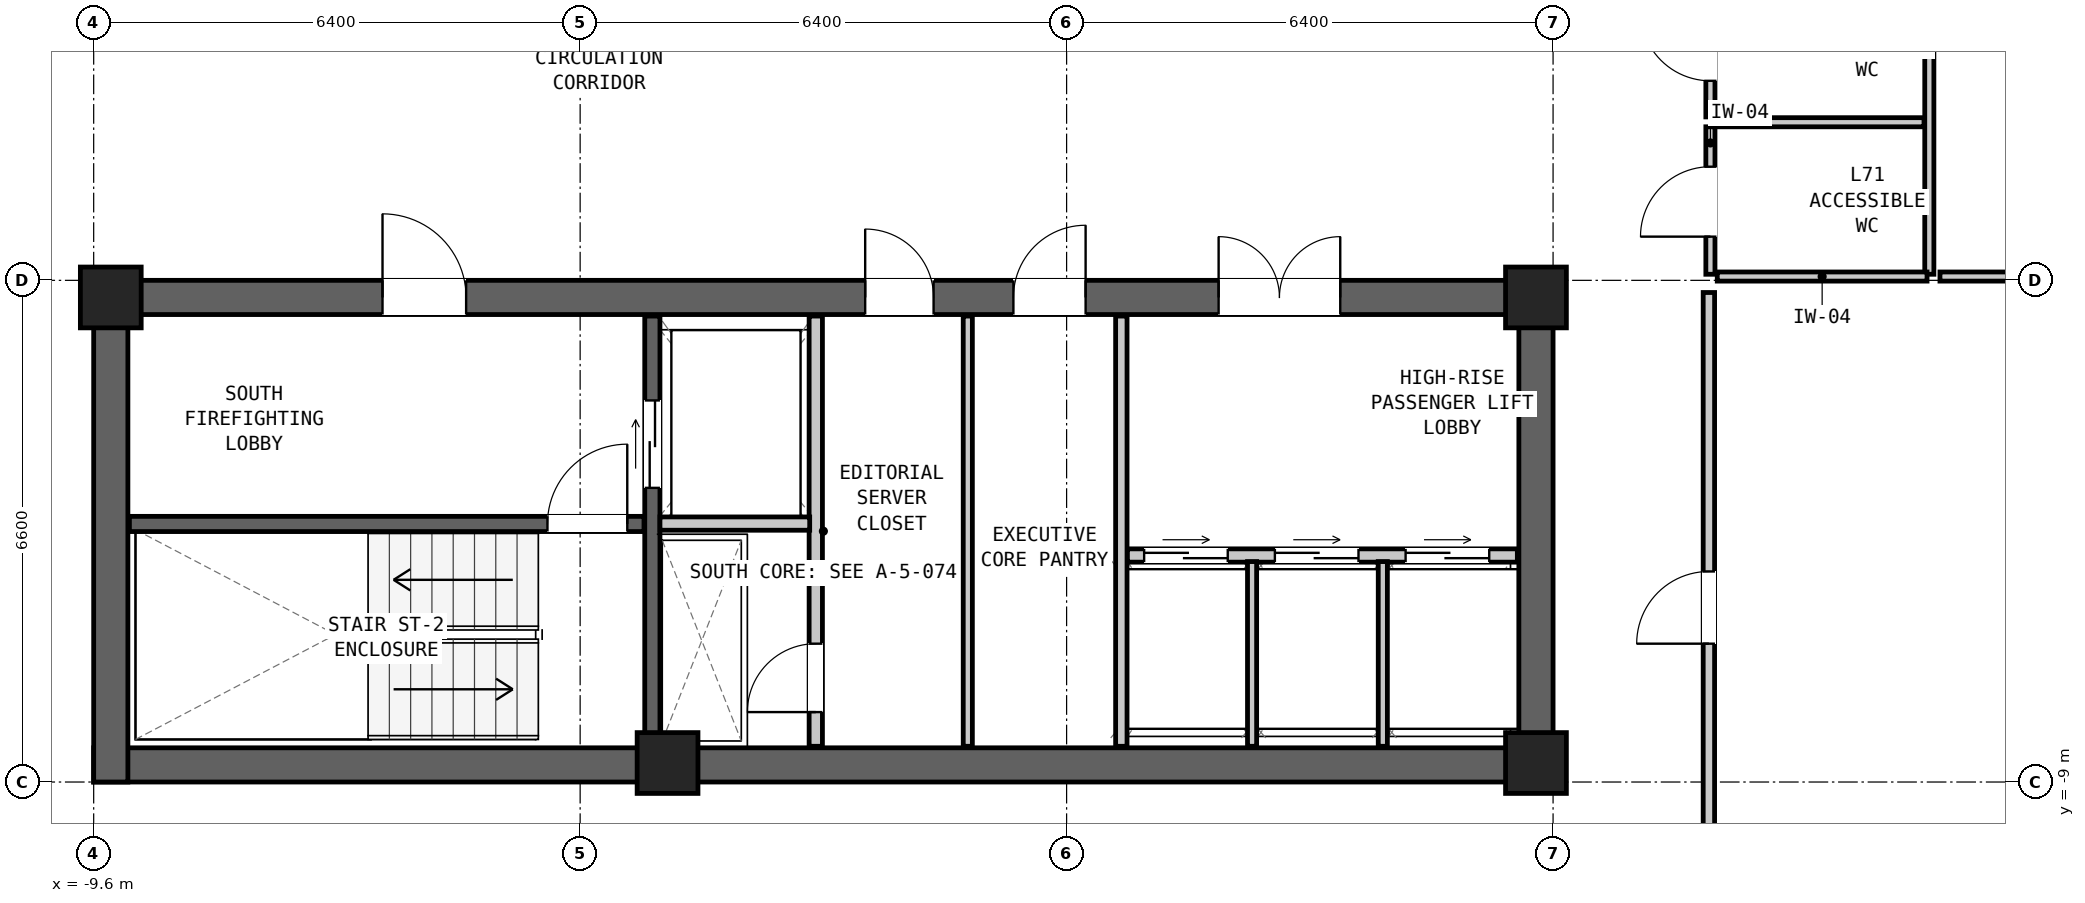
"""IFC4 building model, lengths in metres.
Left out: names, types, materials, properties, quantities, classifications, styles, units other than length and angle.
Written with IfcOpenShell. Run it as: python <this file> out.ifc"""

import sys

from ifc_helpers import new_model, si_unit, direction, frame, frame_2d, origin, origin_2d, place, context, subcontext, project, spatial, rectangle, extrude, element, fill, save


model = new_model("IFC4")
c1 = context("Model", 3, precision=1e-05, world=origin(), true_north=direction((0.0, 1.0)))
c2 = subcontext(c1, "Body", "Model", "MODEL_VIEW")
j1 = project(units=[si_unit("LENGTHUNIT", "METRE"), si_unit("PLANEANGLEUNIT", "RADIAN")], contexts=[c1])
p1 = place(None, origin())
s1 = spatial("IfcSite", under=j1, at=p1, CompositionType="ELEMENT")
p2 = place(p1, origin())
s2 = spatial("IfcBuilding", under=s1, at=p2, CompositionType="ELEMENT")
p3 = place(p2, frame((0.0, 0.0, 242.85)))
s3 = spatial("IfcBuildingStorey", under=s2, at=p3, CompositionType="ELEMENT", Elevation=242.85)
p4 = place(p3, frame((-9.6, -8.775, 0.0), z_axis=(0.0, 0.0, 1.0), x_axis=(1.0, 0.0, 0.0)))
e1 = element("IfcWall", 1, at=p4, inside=s3, PredefinedType="SHEAR", context=c2, shape_type="SweptSolid", body=[
    extrude(rectangle(XDim=19.2, YDim=0.45, at=frame_2d((9.6, 0.0))), origin(), (0.0, 0.0, 1.0), 3.05),
])
p5 = place(p3, frame((-9.6, -2.625, 0.0), z_axis=(0.0, 0.0, 1.0), x_axis=(1.0, 0.0, 0.0)))
e2 = element("IfcWall", 2, at=p5, inside=s3, PredefinedType="SHEAR", context=c2, shape_type="SweptSolid", body=[
    extrude(rectangle(XDim=19.2, YDim=0.45, at=frame_2d((9.6, 0.0))), origin(), (0.0, 0.0, 1.0), 3.05),
])
p6 = place(p5, frame((3.8, 0.0, 0.0)))
e3 = element("IfcOpeningElement", 3, at=p6, cuts=e2, PredefinedType="OPENING", context=c2, shape_type="SweptSolid", body=[
    extrude(rectangle(XDim=1.1, YDim=2.08, at=frame_2d((0.55, 1.04))), frame((0.0, 0.237, 0.0), z_axis=(0.0, -1.0, 0.0), x_axis=(1.0, 0.0, 0.0)), (0.0, 0.0, 1.0), 0.474),
])
p7 = place(p5, frame((10.15, 0.0, 0.0)))
e4 = element("IfcOpeningElement", 4, at=p7, cuts=e2, PredefinedType="OPENING", context=c2, shape_type="SweptSolid", body=[
    extrude(rectangle(XDim=0.9, YDim=2.05, at=frame_2d((0.45, 1.025))), frame((0.0, 0.237, 0.0), z_axis=(0.0, -1.0, 0.0), x_axis=(1.0, 0.0, 0.0)), (0.0, 0.0, 1.0), 0.474),
])
p8 = place(p5, frame((12.1, 0.0, 0.0)))
e5 = element("IfcOpeningElement", 5, at=p8, cuts=e2, PredefinedType="OPENING", context=c2, shape_type="SweptSolid", body=[
    extrude(rectangle(XDim=0.95, YDim=2.1, at=frame_2d((0.475, 1.05))), frame((0.0, 0.237, 0.0), z_axis=(0.0, -1.0, 0.0), x_axis=(1.0, 0.0, 0.0)), (0.0, 0.0, 1.0), 0.474),
])
p9 = place(p5, frame((14.8, 0.0, 0.0)))
e6 = element("IfcOpeningElement", 6, at=p9, cuts=e2, PredefinedType="OPENING", context=c2, shape_type="SweptSolid", body=[
    extrude(rectangle(XDim=1.6, YDim=2.12, at=frame_2d((0.8, 1.06))), frame((0.0, 0.237, 0.0), z_axis=(0.0, -1.0, 0.0), x_axis=(1.0, 0.0, 0.0)), (0.0, 0.0, 1.0), 0.474),
])
for number, where, z_axis, x_axis in (
    (7, (-9.375, -9.0, 0.0), (0.0, 0.0, 1.0), (0.0, 1.0, 0.0)),
    (8, (9.375, -9.0, 0.0), (0.0, 0.0, 1.0), (0.0, 1.0, 0.0)),
):
    element("IfcWall", number, at=place(p3, frame(where, z_axis=z_axis, x_axis=x_axis)), inside=s3, PredefinedType="SHEAR", context=c2, shape_type="SweptSolid", body=[
        extrude(rectangle(XDim=6.6, YDim=0.45, at=frame_2d((3.3, 0.0))), origin(), (0.0, 0.0, 1.0), 3.05),
    ])
for number, where, z_axis, x_axis in (
    (9, (-9.375, -2.625, 0.0), (0.0, 0.0, 1.0), (1.0, 0.0, 0.0)),
    (10, (9.375, -2.625, 0.0), (0.0, 0.0, 1.0), (1.0, 0.0, 0.0)),
    (11, (-2.05, -8.75, 0.0), (0.0, 0.0, 1.0), (1.0, 0.0, 0.0)),
    (12, (9.375, -8.75, 0.0), (0.0, 0.0, 1.0), (1.0, 0.0, 0.0)),
):
    element("IfcColumn", number, at=place(p3, frame(where, z_axis=z_axis, x_axis=x_axis)), inside=s3, PredefinedType="COLUMN", context=c2, shape_type="SweptSolid", body=[
        extrude(rectangle(XDim=0.8, YDim=0.8, at=origin_2d()), origin(), (0.0, 0.0, 1.0), 3.05),
    ])
p10 = place(p3, frame((-9.13, -5.605, 0.0), z_axis=(0.0, 0.0, 1.0), x_axis=(1.0, 0.0, 0.0)))
e13 = element("IfcWall", 13, at=p10, inside=s3, PredefinedType="SHEAR", context=c2, shape_type="SweptSolid", body=[
    extrude(rectangle(XDim=6.77, YDim=0.2, at=frame_2d((3.385, 0.0))), origin(), (0.0, 0.0, 1.0), 2.86),
])
p11 = place(p10, frame((5.5, 0.0, 0.0)))
e14 = element("IfcOpeningElement", 14, at=p11, cuts=e13, PredefinedType="OPENING", context=c2, shape_type="SweptSolid", body=[
    extrude(rectangle(XDim=1.05, YDim=2.08, at=frame_2d((0.525, 1.04))), frame((0.0, 0.112, 0.0), z_axis=(0.0, -1.0, 0.0), x_axis=(1.0, 0.0, 0.0)), (0.0, 0.0, 1.0), 0.224),
])
p12 = place(p3, frame((-2.25, -8.53, 0.0), z_axis=(0.0, 0.0, 1.0), x_axis=(0.0, 1.0, 0.0)))
e15 = element("IfcWall", 15, at=p12, inside=s3, PredefinedType="SHEAR", context=c2, shape_type="SweptSolid", body=[
    extrude(rectangle(XDim=5.66, YDim=0.2, at=frame_2d((2.83, 0.0))), origin(), (0.0, 0.0, 1.0), 2.86),
])
p13 = place(p12, frame((3.4, 0.0, 0.0)))
e16 = element("IfcOpeningElement", 16, at=p13, cuts=e15, PredefinedType="OPENING", context=c2, shape_type="SweptSolid", body=[
    extrude(rectangle(XDim=1.15, YDim=2.08, at=frame_2d((0.575, 1.04))), frame((0.0, 0.112, 0.0), z_axis=(0.0, -1.0, 0.0), x_axis=(1.0, 0.0, 0.0)), (0.0, 0.0, 1.0), 0.224),
])
p14 = place(p3, frame((-0.1, -8.53, 0.0), z_axis=(0.0, 0.0, 1.0), x_axis=(0.0, 1.0, 0.0)))
e17 = element("IfcWall", 17, at=p14, inside=s3, PredefinedType="PARTITIONING", context=c2, shape_type="SweptSolid", body=[
    extrude(rectangle(XDim=5.66, YDim=0.175, at=frame_2d((2.83, 0.0))), origin(), (0.0, 0.0, 1.0), 2.86),
])
p15 = place(p14, frame((0.45, 0.0, 0.0)))
e18 = element("IfcOpeningElement", 18, at=p15, cuts=e17, PredefinedType="OPENING", context=c2, shape_type="SweptSolid", body=[
    extrude(rectangle(XDim=0.9, YDim=2.05, at=frame_2d((0.45, 1.025))), frame((0.0, 0.1, 0.0), z_axis=(0.0, -1.0, 0.0), x_axis=(1.0, 0.0, 0.0)), (0.0, 0.0, 1.0), 0.199),
])
p16 = place(p3, frame((-2.15, -5.6, 0.0), z_axis=(0.0, 0.0, 1.0), x_axis=(1.0, 0.0, 0.0)))
e19 = element("IfcWall", 19, at=p16, inside=s3, PredefinedType="PARTITIONING", context=c2, shape_type="SweptSolid", body=[
    extrude(rectangle(XDim=1.97, YDim=0.175, at=frame_2d((0.985, 0.0))), origin(), (0.0, 0.0, 1.0), 2.86),
])
p17 = place(p3, frame((3.92, -8.53, 0.0), z_axis=(0.0, 0.0, 1.0), x_axis=(0.0, 1.0, 0.0)))
e20 = element("IfcWall", 20, at=p17, inside=s3, PredefinedType="PARTITIONING", context=c2, shape_type="SweptSolid", body=[
    extrude(rectangle(XDim=5.66, YDim=0.15, at=frame_2d((2.83, 0.0))), origin(), (0.0, 0.0, 1.0), 2.86),
])
p18 = place(p3, frame((1.9, -8.53, 0.0), z_axis=(0.0, 0.0, 1.0), x_axis=(0.0, 1.0, 0.0)))
e21 = element("IfcWall", 21, at=p18, inside=s3, PredefinedType="PARTITIONING", context=c2, shape_type="SweptSolid", body=[
    extrude(rectangle(XDim=5.66, YDim=0.12, at=frame_2d((2.83, 0.0))), origin(), (0.0, 0.0, 1.0), 2.86),
])
p19 = place(p3, frame((4.0, -6.02, 0.0), z_axis=(0.0, 0.0, 1.0), x_axis=(1.0, 0.0, 0.0)))
e22 = element("IfcWall", 22, at=p19, inside=s3, PredefinedType="PARTITIONING", context=c2, shape_type="SweptSolid", body=[
    extrude(rectangle(XDim=5.13, YDim=0.175, at=frame_2d((2.565, 0.0))), origin(), (0.0, 0.0, 1.0), 2.86),
])
p20 = place(p19, frame((0.22, 0.0, 0.0)))
e23 = element("IfcOpeningElement", 23, at=p20, cuts=e22, PredefinedType="OPENING", context=c2, shape_type="SweptSolid", body=[
    extrude(rectangle(XDim=1.1, YDim=2.06, at=frame_2d((0.55, 1.03))), frame((0.0, 0.1, 0.0), z_axis=(0.0, -1.0, 0.0), x_axis=(1.0, 0.0, 0.0)), (0.0, 0.0, 1.0), 0.199),
])
p21 = place(p19, frame((1.94, 0.0, 0.0)))
e24 = element("IfcOpeningElement", 24, at=p21, cuts=e22, PredefinedType="OPENING", context=c2, shape_type="SweptSolid", body=[
    extrude(rectangle(XDim=1.1, YDim=2.06, at=frame_2d((0.55, 1.03))), frame((0.0, 0.1, 0.0), z_axis=(0.0, -1.0, 0.0), x_axis=(1.0, 0.0, 0.0)), (0.0, 0.0, 1.0), 0.199),
])
p22 = place(p19, frame((3.66, 0.0, 0.0)))
e25 = element("IfcOpeningElement", 25, at=p22, cuts=e22, PredefinedType="OPENING", context=c2, shape_type="SweptSolid", body=[
    extrude(rectangle(XDim=1.1, YDim=2.06, at=frame_2d((0.55, 1.03))), frame((0.0, 0.1, 0.0), z_axis=(0.0, -1.0, 0.0), x_axis=(1.0, 0.0, 0.0)), (0.0, 0.0, 1.0), 0.199),
])
for number, where, z_axis, x_axis in (
    (26, (5.64, -8.53, 0.0), (0.0, 0.0, 1.0), (0.0, 1.0, 0.0)),
    (27, (7.36, -8.53, 0.0), (0.0, 0.0, 1.0), (0.0, 1.0, 0.0)),
):
    element("IfcWall", number, at=place(p3, frame(where, z_axis=z_axis, x_axis=x_axis)), inside=s3, PredefinedType="PARTITIONING", context=c2, shape_type="SweptSolid", body=[
        extrude(rectangle(XDim=2.43, YDim=0.12, at=frame_2d((1.215, 0.0))), origin(), (0.0, 0.0, 1.0), 2.86),
    ])
p23 = place(p3, frame((11.67, -2.32, 0.0), z_axis=(0.0, 0.0, 1.0), x_axis=(0.0, 1.0, 0.0)))
e28 = element("IfcWall", 28, at=p23, inside=s3, PredefinedType="PARTITIONING", context=c2, shape_type="SweptSolid", body=[
    extrude(rectangle(XDim=1.94, YDim=0.12, at=frame_2d((0.97, 0.0))), origin(), (0.0, 0.0, 1.0), 2.86),
])
p24 = place(p23, frame((0.495, 0.0, 0.0)))
e29 = element("IfcOpeningElement", 29, at=p24, cuts=e28, PredefinedType="OPENING", context=c2, shape_type="SweptSolid", body=[
    extrude(rectangle(XDim=0.92, YDim=2.1, at=frame_2d((0.46, 1.05))), frame((0.0, 0.072, 0.0), z_axis=(0.0, -1.0, 0.0), x_axis=(1.0, 0.0, 0.0)), (0.0, 0.0, 1.0), 0.144),
])
p25 = place(p3, frame((11.67, -0.25, 0.0), z_axis=(0.0, 0.0, 1.0), x_axis=(0.0, 1.0, 0.0)))
e30 = element("IfcWall", 30, at=p25, inside=s3, PredefinedType="PARTITIONING", context=c2, shape_type="SweptSolid", body=[
    extrude(rectangle(XDim=1.9, YDim=0.12, at=frame_2d((0.95, 0.0))), origin(), (0.0, 0.0, 1.0), 2.86),
])
p26 = place(p25, frame((0.475, 0.0, 0.0)))
e31 = element("IfcOpeningElement", 31, at=p26, cuts=e30, PredefinedType="OPENING", context=c2, shape_type="SweptSolid", body=[
    extrude(rectangle(XDim=0.92, YDim=2.1, at=frame_2d((0.46, 1.05))), frame((0.0, 0.072, 0.0), z_axis=(0.0, -1.0, 0.0), x_axis=(1.0, 0.0, 0.0)), (0.0, 0.0, 1.0), 0.144),
])
p27 = place(p3, frame((14.55, -2.32, 0.0), z_axis=(0.0, 0.0, 1.0), x_axis=(0.0, 1.0, 0.0)))
e32 = element("IfcWall", 32, at=p27, inside=s3, PredefinedType="PARTITIONING", context=c2, shape_type="SweptSolid", body=[
    extrude(rectangle(XDim=5.93, YDim=0.12, at=frame_2d((2.965, 0.0))), origin(), (0.0, 0.0, 1.0), 2.86),
])
p28 = place(p3, frame((11.76, -2.35, 0.0), z_axis=(0.0, 0.0, 1.0), x_axis=(1.0, 0.0, 0.0)))
e33 = element("IfcWall", 33, at=p28, inside=s3, PredefinedType="PARTITIONING", context=c2, shape_type="SweptSolid", body=[
    extrude(rectangle(XDim=2.76, YDim=0.12, at=frame_2d((1.38, 0.0))), origin(), (0.0, 0.0, 1.0), 1.722),
])
p29 = place(p3, frame((11.76, -0.32, 0.0), z_axis=(0.0, 0.0, 1.0), x_axis=(1.0, 0.0, 0.0)))
e34 = element("IfcWall", 34, at=p29, inside=s3, PredefinedType="PARTITIONING", context=c2, shape_type="SweptSolid", body=[
    extrude(rectangle(XDim=2.72, YDim=0.12, at=frame_2d((1.36, 0.0))), origin(), (0.0, 0.0, 1.0), 2.86),
])
p30 = place(p3, frame((14.69, -2.35, 0.0), z_axis=(0.0, 0.0, 1.0), x_axis=(1.0, 0.0, 0.0)))
e35 = element("IfcWall", 35, at=p30, inside=s3, PredefinedType="PARTITIONING", context=c2, shape_type="SweptSolid", body=[
    extrude(rectangle(XDim=6.927, YDim=0.12, at=frame_2d((3.464, 0.0))), origin(), (0.0, 0.0, 1.0), 1.722),
])
p31 = place(p3, frame((11.65, -10.85, 0.0), z_axis=(0.0, 0.0, 1.0), x_axis=(0.0, 1.0, 0.0)))
e36 = element("IfcWall", 36, at=p31, inside=s3, PredefinedType="PARTITIONING", context=c2, shape_type="SweptSolid", body=[
    extrude(rectangle(XDim=8.29, YDim=0.15, at=frame_2d((4.145, 0.0))), origin(), (0.0, 0.0, 1.0), 2.86),
])
p32 = place(p31, frame((3.67, 0.0, 0.0)))
e37 = element("IfcOpeningElement", 37, at=p32, cuts=e36, PredefinedType="OPENING", context=c2, shape_type="SweptSolid", body=[
    extrude(rectangle(XDim=0.95, YDim=2.1, at=frame_2d((0.475, 1.05))), frame((0.0, 0.087, 0.0), z_axis=(0.0, -1.0, 0.0), x_axis=(1.0, 0.0, 0.0)), (0.0, 0.0, 1.0), 0.174),
])
p33 = place(p11, origin())
e38 = element("IfcDoor", 38, at=p33, inside=s3, OperationType="SINGLE_SWING_RIGHT", PredefinedType="DOOR", context=c2, shape_type="SweptSolid", body=[
    extrude(rectangle(XDim=1.05, YDim=2.08, at=frame_2d((0.525, 1.04))), frame((0.0, 0.025, 0.0), z_axis=(0.0, -1.0, 0.0), x_axis=(1.0, 0.0, 0.0)), (0.0, 0.0, 1.0), 0.05),
])
fill(e14, e38)
p34 = place(p6, origin())
e39 = element("IfcDoor", 39, at=p34, inside=s3, OperationType="SINGLE_SWING_LEFT", PredefinedType="DOOR", context=c2, shape_type="SweptSolid", body=[
    extrude(rectangle(XDim=1.1, YDim=2.08, at=frame_2d((0.55, 1.04))), frame((0.0, 0.025, 0.0), z_axis=(0.0, -1.0, 0.0), x_axis=(1.0, 0.0, 0.0)), (0.0, 0.0, 1.0), 0.05),
])
fill(e3, e39)
p35 = place(p13, origin())
e40 = element("IfcDoor", 40, at=p35, inside=s3, OperationType="DOUBLE_DOOR_SLIDING", PredefinedType="DOOR", context=c2, shape_type="SweptSolid", body=[
    extrude(rectangle(XDim=1.15, YDim=2.08, at=frame_2d((0.575, 1.04))), frame((0.0, 0.025, 0.0), z_axis=(0.0, -1.0, 0.0), x_axis=(1.0, 0.0, 0.0)), (0.0, 0.0, 1.0), 0.05),
])
fill(e16, e40)
p36 = place(p15, origin())
e41 = element("IfcDoor", 41, at=p36, inside=s3, OperationType="SINGLE_SWING_LEFT", PredefinedType="DOOR", context=c2, shape_type="SweptSolid", body=[
    extrude(rectangle(XDim=0.9, YDim=2.05, at=frame_2d((0.45, 1.025))), frame((0.0, 0.025, 0.0), z_axis=(0.0, -1.0, 0.0), x_axis=(1.0, 0.0, 0.0)), (0.0, 0.0, 1.0), 0.05),
])
fill(e18, e41)
p37 = place(p7, origin())
e42 = element("IfcDoor", 42, at=p37, inside=s3, OperationType="SINGLE_SWING_LEFT", PredefinedType="DOOR", context=c2, shape_type="SweptSolid", body=[
    extrude(rectangle(XDim=0.9, YDim=2.05, at=frame_2d((0.45, 1.025))), frame((0.0, 0.025, 0.0), z_axis=(0.0, -1.0, 0.0), x_axis=(1.0, 0.0, 0.0)), (0.0, 0.0, 1.0), 0.05),
])
fill(e4, e42)
p38 = place(p8, origin())
e43 = element("IfcDoor", 43, at=p38, inside=s3, OperationType="SINGLE_SWING_RIGHT", PredefinedType="DOOR", context=c2, shape_type="SweptSolid", body=[
    extrude(rectangle(XDim=0.95, YDim=2.1, at=frame_2d((0.475, 1.05))), frame((0.0, 0.025, 0.0), z_axis=(0.0, -1.0, 0.0), x_axis=(1.0, 0.0, 0.0)), (0.0, 0.0, 1.0), 0.05),
])
fill(e5, e43)
p39 = place(p20, origin())
e44 = element("IfcDoor", 44, at=p39, inside=s3, OperationType="DOUBLE_DOOR_SLIDING", PredefinedType="DOOR", context=c2, shape_type="SweptSolid", body=[
    extrude(rectangle(XDim=1.1, YDim=2.06, at=frame_2d((0.55, 1.03))), frame((0.0, 0.025, 0.0), z_axis=(0.0, -1.0, 0.0), x_axis=(1.0, 0.0, 0.0)), (0.0, 0.0, 1.0), 0.05),
])
fill(e23, e44)
p40 = place(p21, origin())
e45 = element("IfcDoor", 45, at=p40, inside=s3, OperationType="DOUBLE_DOOR_SLIDING", PredefinedType="DOOR", context=c2, shape_type="SweptSolid", body=[
    extrude(rectangle(XDim=1.1, YDim=2.06, at=frame_2d((0.55, 1.03))), frame((0.0, 0.025, 0.0), z_axis=(0.0, -1.0, 0.0), x_axis=(1.0, 0.0, 0.0)), (0.0, 0.0, 1.0), 0.05),
])
fill(e24, e45)
p41 = place(p22, origin())
e46 = element("IfcDoor", 46, at=p41, inside=s3, OperationType="DOUBLE_DOOR_SLIDING", PredefinedType="DOOR", context=c2, shape_type="SweptSolid", body=[
    extrude(rectangle(XDim=1.1, YDim=2.06, at=frame_2d((0.55, 1.03))), frame((0.0, 0.025, 0.0), z_axis=(0.0, -1.0, 0.0), x_axis=(1.0, 0.0, 0.0)), (0.0, 0.0, 1.0), 0.05),
])
fill(e25, e46)
p42 = place(p9, origin())
e47 = element("IfcDoor", 47, at=p42, inside=s3, OperationType="DOUBLE_DOOR_SINGLE_SWING", PredefinedType="DOOR", context=c2, shape_type="SweptSolid", body=[
    extrude(rectangle(XDim=1.6, YDim=2.12, at=frame_2d((0.8, 1.06))), frame((0.0, 0.025, 0.0), z_axis=(0.0, -1.0, 0.0), x_axis=(1.0, 0.0, 0.0)), (0.0, 0.0, 1.0), 0.05),
])
fill(e6, e47)
p43 = place(p24, origin())
e48 = element("IfcDoor", 48, at=p43, inside=s3, OperationType="SINGLE_SWING_LEFT", PredefinedType="DOOR", context=c2, shape_type="SweptSolid", body=[
    extrude(rectangle(XDim=0.92, YDim=2.1, at=frame_2d((0.46, 1.05))), frame((0.0, 0.025, 0.0), z_axis=(0.0, -1.0, 0.0), x_axis=(1.0, 0.0, 0.0)), (0.0, 0.0, 1.0), 0.05),
])
fill(e29, e48)
p44 = place(p26, origin())
e49 = element("IfcDoor", 49, at=p44, inside=s3, OperationType="SINGLE_SWING_RIGHT", PredefinedType="DOOR", context=c2, shape_type="SweptSolid", body=[
    extrude(rectangle(XDim=0.92, YDim=2.1, at=frame_2d((0.46, 1.05))), frame((0.0, 0.025, 0.0), z_axis=(0.0, -1.0, 0.0), x_axis=(1.0, 0.0, 0.0)), (0.0, 0.0, 1.0), 0.05),
])
fill(e31, e49)
p45 = place(p32, origin())
e50 = element("IfcDoor", 50, at=p45, inside=s3, OperationType="SINGLE_SWING_LEFT", PredefinedType="DOOR", context=c2, shape_type="SweptSolid", body=[
    extrude(rectangle(XDim=0.95, YDim=2.1, at=frame_2d((0.475, 1.05))), frame((0.0, 0.025, 0.0), z_axis=(0.0, -1.0, 0.0), x_axis=(1.0, 0.0, 0.0)), (0.0, 0.0, 1.0), 0.05),
])
fill(e37, e50)
save(model, sys.argv[1])
